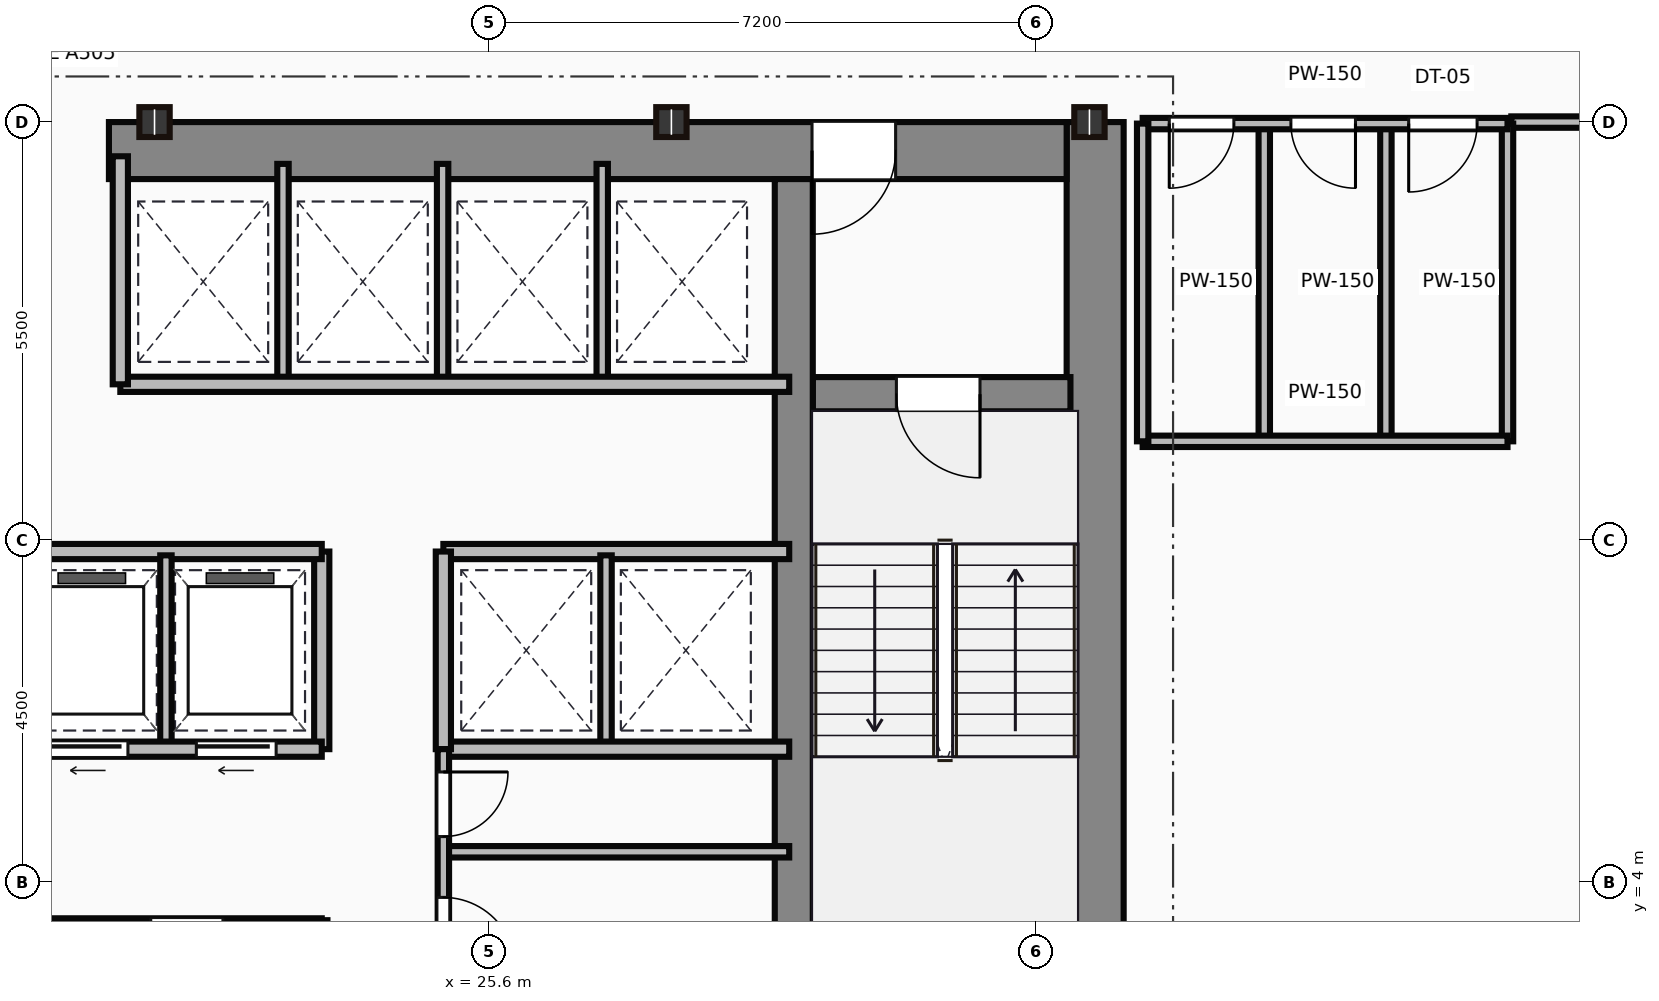
"""IFC4 building model, lengths in metres.
Left out: names, types, materials, properties, quantities, classifications, styles, units other than length and angle.
Written with IfcOpenShell. Run it as: python <this file> out.ifc"""

import sys

from ifc_helpers import new_model, si_unit, direction, frame, frame_2d, origin, origin_2d, place, context, subcontext, project, spatial, rectangle, i_section, extrude, source, transform, mapped, element, fill, save


model = new_model("IFC4")
c1 = context("Model", 3, precision=1e-05, world=origin(), true_north=direction((0.0, 1.0)))
c2 = subcontext(c1, "Body", "Model", "MODEL_VIEW")
j1 = project(units=[si_unit("LENGTHUNIT", "METRE"), si_unit("PLANEANGLEUNIT", "RADIAN")], contexts=[c1])
p1 = place(None, origin())
s1 = spatial("IfcSite", under=j1, at=p1, CompositionType="ELEMENT")
p2 = place(p1, origin())
s2 = spatial("IfcBuilding", under=s1, at=p2, CompositionType="ELEMENT")
p3 = place(p2, frame((0.0, 0.0, 106.9)))
s3 = spatial("IfcBuildingStorey", under=s2, at=p3, CompositionType="ELEMENT", Elevation=106.9)
m1 = source(origin(), c2, "Body", "SweptSolid", [
    extrude(rectangle(XDim=13.1, YDim=0.75, at=frame_2d((6.55, 0.0))), origin(), (0.0, 0.0, 1.0), 3.65),
])
p4 = place(p3, frame((33.575, 0.9, 0.0), z_axis=(0.0, 0.0, 1.0), x_axis=(0.0, 1.0, 0.0)))
e1 = element("IfcWall", 1, at=p4, inside=s3, PredefinedType="SHEAR", context=c2, shape_type="MappedRepresentation", body=[
    mapped(m1, transform((0.0, 0.0, 0.0))),
])
m2 = source(origin(), c2, "Body", "SweptSolid", [
    extrude(rectangle(XDim=12.6, YDim=0.75, at=frame_2d((6.3, 0.0))), origin(), (0.0, 0.0, 1.0), 3.65),
])
p5 = place(p3, frame((20.6, 13.625, 0.0), z_axis=(0.0, 0.0, 1.0), x_axis=(1.0, 0.0, 0.0)))
e2 = element("IfcWall", 2, at=p5, inside=s3, PredefinedType="SHEAR", context=c2, shape_type="MappedRepresentation", body=[
    mapped(m2, transform((0.0, 0.0, 0.0))),
])
p6 = place(p5, frame((9.25, 0.0, 0.0)))
e3 = element("IfcOpeningElement", 3, at=p6, cuts=e2, PredefinedType="OPENING", context=c2, shape_type="SweptSolid", body=[
    extrude(rectangle(XDim=1.1, YDim=2.15, at=frame_2d((0.55, 1.075))), frame((0.0, 0.385, 0.0), z_axis=(0.0, -1.0, 0.0), x_axis=(1.0, 0.0, 0.0)), (0.0, 0.0, 1.0), 0.77),
])
m3 = source(origin(), c2, "Body", "SweptSolid", [
    extrude(rectangle(XDim=12.35, YDim=0.5, at=frame_2d((6.175, 0.0))), origin(), (0.0, 0.0, 1.0), 3.65),
])
p7 = place(p3, frame((29.61, 0.9, 0.0), z_axis=(0.0, 0.0, 1.0), x_axis=(0.0, 1.0, 0.0)))
e4 = element("IfcWall", 4, at=p7, inside=s3, PredefinedType="SHEAR", context=c2, shape_type="MappedRepresentation", body=[
    mapped(m3, transform((0.0, 0.0, 0.0))),
])
m4 = source(origin(), c2, "Body", "SweptSolid", [
    extrude(rectangle(XDim=3.39, YDim=0.45, at=frame_2d((1.695, 0.0))), origin(), (0.0, 0.0, 1.0), 3.65),
])
p8 = place(p3, frame((29.86, 10.42, 0.0), z_axis=(0.0, 0.0, 1.0), x_axis=(1.0, 0.0, 0.0)))
e5 = element("IfcWall", 5, at=p8, inside=s3, PredefinedType="SHEAR", context=c2, shape_type="MappedRepresentation", body=[
    mapped(m4, transform((0.0, 0.0, 0.0))),
])
p9 = place(p8, frame((1.1, 0.0, 0.0)))
e6 = element("IfcOpeningElement", 6, at=p9, cuts=e5, PredefinedType="OPENING", context=c2, shape_type="SweptSolid", body=[
    extrude(rectangle(XDim=1.1, YDim=2.15, at=frame_2d((0.55, 1.075))), frame((0.0, 0.235, 0.0), z_axis=(0.0, -1.0, 0.0), x_axis=(1.0, 0.0, 0.0)), (0.0, 0.0, 1.0), 0.47),
])
m5 = source(origin(), c2, "Body", "SweptSolid", [
    extrude(i_section(OverallWidth=0.399, OverallDepth=0.393, WebThickness=0.023, FlangeThickness=0.037, at=origin_2d()), origin(), (0.0, 0.0, 1.0), 3.65),
])
for number, where, z_axis, x_axis in (
    (7, (21.2, 14.0, 0.0), (0.0, 0.0, 1.0), (1.0, 0.0, 0.0)),
    (8, (28.0, 14.0, 0.0), (0.0, 0.0, 1.0), (1.0, 0.0, 0.0)),
    (9, (33.5, 14.0, 0.0), (0.0, 0.0, 1.0), (1.0, 0.0, 0.0)),
):
    element("IfcColumn", number, at=place(p3, frame(where, z_axis=z_axis, x_axis=x_axis)), inside=s3, PredefinedType="COLUMN", context=c2, shape_type="MappedRepresentation", body=[
        mapped(m5, transform((0.0, 0.0, 0.0))),
    ])
m6 = source(origin(), c2, "Body", "SweptSolid", [
    extrude(rectangle(XDim=10.35, YDim=0.15, at=frame_2d((5.175, 0.0))), origin(), (0.0, 0.0, 1.0), 3.4),
])
p10 = place(p3, frame((13.05, 3.45, 0.0), z_axis=(0.0, 0.0, 1.0), x_axis=(1.0, 0.0, 0.0)))
e10 = element("IfcWall", 10, at=p10, inside=s3, PredefinedType="PARTITIONING", context=c2, shape_type="MappedRepresentation", body=[
    mapped(m6, transform((0.0, 0.0, 0.0))),
])
p11 = place(p10, frame((3.8, 0.0, 0.0)))
e11 = element("IfcOpeningElement", 11, at=p11, cuts=e10, PredefinedType="OPENING", context=c2, shape_type="SweptSolid", body=[
    extrude(rectangle(XDim=0.95, YDim=2.15, at=frame_2d((0.475, 1.075))), frame((0.0, 0.085, 0.0), z_axis=(0.0, -1.0, 0.0), x_axis=(1.0, 0.0, 0.0)), (0.0, 0.0, 1.0), 0.17),
])
p12 = place(p10, frame((8.1, 0.0, 0.0)))
e12 = element("IfcOpeningElement", 12, at=p12, cuts=e10, PredefinedType="OPENING", context=c2, shape_type="SweptSolid", body=[
    extrude(rectangle(XDim=0.95, YDim=2.15, at=frame_2d((0.475, 1.075))), frame((0.0, 0.085, 0.0), z_axis=(0.0, -1.0, 0.0), x_axis=(1.0, 0.0, 0.0)), (0.0, 0.0, 1.0), 0.17),
])
m7 = source(origin(), c2, "Body", "SweptSolid", [
    extrude(rectangle(XDim=2.65, YDim=0.15, at=frame_2d((1.325, 0.0))), origin(), (0.0, 0.0, 1.0), 3.4),
])
p13 = place(p3, frame((23.4, 0.85, 0.0), z_axis=(0.0, 0.0, 1.0), x_axis=(0.0, 1.0, 0.0)))
e13 = element("IfcWall", 13, at=p13, inside=s3, PredefinedType="PARTITIONING", context=c2, shape_type="MappedRepresentation", body=[
    mapped(m7, transform((0.0, 0.0, 0.0))),
])
m8 = source(origin(), c2, "Body", "SweptSolid", [
    extrude(rectangle(XDim=11.85, YDim=0.2, at=frame_2d((5.925, 0.0))), origin(), (0.0, 0.0, 1.0), 3.4),
])
p14 = place(p3, frame((11.55, 5.75, 0.0), z_axis=(0.0, 0.0, 1.0), x_axis=(1.0, 0.0, 0.0)))
e14 = element("IfcWall", 14, at=p14, inside=s3, PredefinedType="PARTITIONING", context=c2, shape_type="MappedRepresentation", body=[
    mapped(m8, transform((0.0, 0.0, 0.0))),
])
p15 = place(p14, frame((0.45, 0.0, 0.0)))
e15 = element("IfcOpeningElement", 15, at=p15, cuts=e14, PredefinedType="OPENING", context=c2, shape_type="SweptSolid", body=[
    extrude(rectangle(XDim=1.05, YDim=2.15, at=frame_2d((0.525, 1.075))), frame((0.0, 0.11, 0.0), z_axis=(0.0, -1.0, 0.0), x_axis=(1.0, 0.0, 0.0)), (0.0, 0.0, 1.0), 0.22),
])
p16 = place(p14, frame((2.4, 0.0, 0.0)))
e16 = element("IfcOpeningElement", 16, at=p16, cuts=e14, PredefinedType="OPENING", context=c2, shape_type="SweptSolid", body=[
    extrude(rectangle(XDim=1.05, YDim=2.15, at=frame_2d((0.525, 1.075))), frame((0.0, 0.11, 0.0), z_axis=(0.0, -1.0, 0.0), x_axis=(1.0, 0.0, 0.0)), (0.0, 0.0, 1.0), 0.22),
])
p17 = place(p14, frame((4.35, 0.0, 0.0)))
e17 = element("IfcOpeningElement", 17, at=p17, cuts=e14, PredefinedType="OPENING", context=c2, shape_type="SweptSolid", body=[
    extrude(rectangle(XDim=1.05, YDim=2.15, at=frame_2d((0.525, 1.075))), frame((0.0, 0.11, 0.0), z_axis=(0.0, -1.0, 0.0), x_axis=(1.0, 0.0, 0.0)), (0.0, 0.0, 1.0), 0.22),
])
p18 = place(p14, frame((6.3, 0.0, 0.0)))
e18 = element("IfcOpeningElement", 18, at=p18, cuts=e14, PredefinedType="OPENING", context=c2, shape_type="SweptSolid", body=[
    extrude(rectangle(XDim=1.05, YDim=2.15, at=frame_2d((0.525, 1.075))), frame((0.0, 0.11, 0.0), z_axis=(0.0, -1.0, 0.0), x_axis=(1.0, 0.0, 0.0)), (0.0, 0.0, 1.0), 0.22),
])
p19 = place(p14, frame((8.25, 0.0, 0.0)))
e19 = element("IfcOpeningElement", 19, at=p19, cuts=e14, PredefinedType="OPENING", context=c2, shape_type="SweptSolid", body=[
    extrude(rectangle(XDim=1.05, YDim=2.15, at=frame_2d((0.525, 1.075))), frame((0.0, 0.11, 0.0), z_axis=(0.0, -1.0, 0.0), x_axis=(1.0, 0.0, 0.0)), (0.0, 0.0, 1.0), 0.22),
])
p20 = place(p14, frame((10.2, 0.0, 0.0)))
e20 = element("IfcOpeningElement", 20, at=p20, cuts=e14, PredefinedType="OPENING", context=c2, shape_type="SweptSolid", body=[
    extrude(rectangle(XDim=1.05, YDim=2.15, at=frame_2d((0.525, 1.075))), frame((0.0, 0.11, 0.0), z_axis=(0.0, -1.0, 0.0), x_axis=(1.0, 0.0, 0.0)), (0.0, 0.0, 1.0), 0.22),
])
p21 = place(p3, frame((11.55, 8.35, 0.0), z_axis=(0.0, 0.0, 1.0), x_axis=(1.0, 0.0, 0.0)))
e21 = element("IfcWall", 21, at=p21, inside=s3, PredefinedType="PARTITIONING", context=c2, shape_type="MappedRepresentation", body=[
    mapped(m8, transform((0.0, 0.0, 0.0))),
])
m9 = source(origin(), c2, "Body", "SweptSolid", [
    extrude(rectangle(XDim=2.6, YDim=0.2, at=frame_2d((1.3, 0.0))), origin(), (0.0, 0.0, 1.0), 3.4),
])
p22 = place(p3, frame((23.4, 5.75, 0.0), z_axis=(0.0, 0.0, 1.0), x_axis=(0.0, 1.0, 0.0)))
e22 = element("IfcWall", 22, at=p22, inside=s3, PredefinedType="PARTITIONING", context=c2, shape_type="MappedRepresentation", body=[
    mapped(m9, transform((0.0, 0.0, 0.0))),
])
m10 = source(origin(), c2, "Body", "SweptSolid", [
    extrude(rectangle(XDim=2.5, YDim=0.15, at=frame_2d((1.25, 0.0))), origin(), (0.0, 0.0, 1.0), 3.4),
])
p23 = place(p3, frame((21.35, 5.8, 0.0), z_axis=(0.0, 0.0, 1.0), x_axis=(0.0, 1.0, 0.0)))
e23 = element("IfcWall", 23, at=p23, inside=s3, PredefinedType="PARTITIONING", context=c2, shape_type="MappedRepresentation", body=[
    mapped(m10, transform((0.0, 0.0, 0.0))),
])
m11 = source(origin(), c2, "Body", "SweptSolid", [
    extrude(rectangle(XDim=8.8, YDim=0.2, at=frame_2d((4.4, 0.0))), origin(), (0.0, 0.0, 1.0), 3.4),
])
p24 = place(p3, frame((20.75, 10.55, 0.0), z_axis=(0.0, 0.0, 1.0), x_axis=(1.0, 0.0, 0.0)))
e24 = element("IfcWall", 24, at=p24, inside=s3, PredefinedType="PARTITIONING", context=c2, shape_type="MappedRepresentation", body=[
    mapped(m11, transform((0.0, 0.0, 0.0))),
])
m12 = source(origin(), c2, "Body", "SweptSolid", [
    extrude(rectangle(XDim=3.0, YDim=0.2, at=frame_2d((1.5, 0.0))), origin(), (0.0, 0.0, 1.0), 3.4),
])
p25 = place(p3, frame((20.75, 10.55, 0.0), z_axis=(0.0, 0.0, 1.0), x_axis=(0.0, 1.0, 0.0)))
e25 = element("IfcWall", 25, at=p25, inside=s3, PredefinedType="PARTITIONING", context=c2, shape_type="MappedRepresentation", body=[
    mapped(m12, transform((0.0, 0.0, 0.0))),
])
m13 = source(origin(), c2, "Body", "SweptSolid", [
    extrude(rectangle(XDim=2.85, YDim=0.15, at=frame_2d((1.425, 0.0))), origin(), (0.0, 0.0, 1.0), 3.4),
])
for number, where, z_axis, x_axis in (
    (26, (22.89, 10.6, 0.0), (0.0, 0.0, 1.0), (0.0, 1.0, 0.0)),
    (27, (24.99, 10.6, 0.0), (0.0, 0.0, 1.0), (0.0, 1.0, 0.0)),
    (28, (27.09, 10.6, 0.0), (0.0, 0.0, 1.0), (0.0, 1.0, 0.0)),
):
    element("IfcWall", number, at=place(p3, frame(where, z_axis=z_axis, x_axis=x_axis)), inside=s3, PredefinedType="PARTITIONING", context=c2, shape_type="MappedRepresentation", body=[
        mapped(m13, transform((0.0, 0.0, 0.0))),
    ])
m14 = source(origin(), c2, "Body", "SweptSolid", [
    extrude(rectangle(XDim=4.55, YDim=0.2, at=frame_2d((2.275, 0.0))), origin(), (0.0, 0.0, 1.0), 3.4),
])
for number, where, z_axis, x_axis in (
    (29, (25.0, 8.35, 0.0), (0.0, 0.0, 1.0), (1.0, 0.0, 0.0)),
    (30, (25.0, 5.75, 0.0), (0.0, 0.0, 1.0), (1.0, 0.0, 0.0)),
):
    element("IfcWall", number, at=place(p3, frame(where, z_axis=z_axis, x_axis=x_axis)), inside=s3, PredefinedType="PARTITIONING", context=c2, shape_type="MappedRepresentation", body=[
        mapped(m14, transform((0.0, 0.0, 0.0))),
    ])
p26 = place(p3, frame((25.0, 5.75, 0.0), z_axis=(0.0, 0.0, 1.0), x_axis=(0.0, 1.0, 0.0)))
e31 = element("IfcWall", 31, at=p26, inside=s3, PredefinedType="PARTITIONING", context=c2, shape_type="MappedRepresentation", body=[
    mapped(m9, transform((0.0, 0.0, 0.0))),
])
p27 = place(p3, frame((27.14, 5.8, 0.0), z_axis=(0.0, 0.0, 1.0), x_axis=(0.0, 1.0, 0.0)))
e32 = element("IfcWall", 32, at=p27, inside=s3, PredefinedType="PARTITIONING", context=c2, shape_type="MappedRepresentation", body=[
    mapped(m10, transform((0.0, 0.0, 0.0))),
])
m15 = source(origin(), c2, "Body", "SweptSolid", [
    extrude(rectangle(XDim=4.9, YDim=0.15, at=frame_2d((2.45, 0.0))), origin(), (0.0, 0.0, 1.0), 3.4),
])
p28 = place(p3, frame((25.0, 0.85, 0.0), z_axis=(0.0, 0.0, 1.0), x_axis=(0.0, 1.0, 0.0)))
e33 = element("IfcWall", 33, at=p28, inside=s3, PredefinedType="PARTITIONING", context=c2, shape_type="MappedRepresentation", body=[
    mapped(m15, transform((0.0, 0.0, 0.0))),
])
p29 = place(p28, frame((2.0, 0.0, 0.0)))
e34 = element("IfcOpeningElement", 34, at=p29, cuts=e33, PredefinedType="OPENING", context=c2, shape_type="SweptSolid", body=[
    extrude(rectangle(XDim=0.95, YDim=2.15, at=frame_2d((0.475, 1.075))), frame((0.0, 0.085, 0.0), z_axis=(0.0, -1.0, 0.0), x_axis=(1.0, 0.0, 0.0)), (0.0, 0.0, 1.0), 0.17),
])
p30 = place(p28, frame((3.75, 0.0, 0.0)))
e35 = element("IfcOpeningElement", 35, at=p30, cuts=e33, PredefinedType="OPENING", context=c2, shape_type="SweptSolid", body=[
    extrude(rectangle(XDim=0.85, YDim=2.15, at=frame_2d((0.425, 1.075))), frame((0.0, 0.085, 0.0), z_axis=(0.0, -1.0, 0.0), x_axis=(1.0, 0.0, 0.0)), (0.0, 0.0, 1.0), 0.17),
])
m16 = source(origin(), c2, "Body", "SweptSolid", [
    extrude(rectangle(XDim=4.55, YDim=0.15, at=frame_2d((2.275, 0.0))), origin(), (0.0, 0.0, 1.0), 3.4),
])
p31 = place(p3, frame((25.0, 4.4, 0.0), z_axis=(0.0, 0.0, 1.0), x_axis=(1.0, 0.0, 0.0)))
e36 = element("IfcWall", 36, at=p31, inside=s3, PredefinedType="PARTITIONING", context=c2, shape_type="MappedRepresentation", body=[
    mapped(m16, transform((0.0, 0.0, 0.0))),
])
m17 = source(origin(), c2, "Body", "SweptSolid", [
    extrude(rectangle(XDim=4.8, YDim=0.15, at=frame_2d((2.4, 0.0))), origin(), (0.0, 0.0, 1.0), 2.702),
])
p32 = place(p3, frame((34.2, 13.98, 0.0), z_axis=(0.0, 0.0, 1.0), x_axis=(1.0, 0.0, 0.0)))
e37 = element("IfcWall", 37, at=p32, inside=s3, PredefinedType="PARTITIONING", context=c2, shape_type="MappedRepresentation", body=[
    mapped(m17, transform((0.0, 0.0, 0.0))),
])
p33 = place(p32, frame((0.35, 0.0, 0.0)))
e38 = element("IfcOpeningElement", 38, at=p33, cuts=e37, PredefinedType="OPENING", context=c2, shape_type="SweptSolid", body=[
    extrude(rectangle(XDim=0.85, YDim=2.1, at=frame_2d((0.425, 1.05))), frame((0.0, 0.085, 0.0), z_axis=(0.0, -1.0, 0.0), x_axis=(1.0, 0.0, 0.0)), (0.0, 0.0, 1.0), 0.17),
])
p34 = place(p32, frame((1.95, 0.0, 0.0)))
e39 = element("IfcOpeningElement", 39, at=p34, cuts=e37, PredefinedType="OPENING", context=c2, shape_type="SweptSolid", body=[
    extrude(rectangle(XDim=0.85, YDim=2.1, at=frame_2d((0.425, 1.05))), frame((0.0, 0.085, 0.0), z_axis=(0.0, -1.0, 0.0), x_axis=(1.0, 0.0, 0.0)), (0.0, 0.0, 1.0), 0.17),
])
p35 = place(p32, frame((3.5, 0.0, 0.0)))
e40 = element("IfcOpeningElement", 40, at=p35, cuts=e37, PredefinedType="OPENING", context=c2, shape_type="SweptSolid", body=[
    extrude(rectangle(XDim=0.9, YDim=2.1, at=frame_2d((0.45, 1.05))), frame((0.0, 0.085, 0.0), z_axis=(0.0, -1.0, 0.0), x_axis=(1.0, 0.0, 0.0)), (0.0, 0.0, 1.0), 0.17),
])
m18 = source(origin(), c2, "Body", "SweptSolid", [
    extrude(rectangle(XDim=4.8, YDim=0.15, at=frame_2d((2.4, 0.0))), origin(), (0.0, 0.0, 1.0), 3.4),
])
p36 = place(p3, frame((34.2, 9.8, 0.0), z_axis=(0.0, 0.0, 1.0), x_axis=(1.0, 0.0, 0.0)))
e41 = element("IfcWall", 41, at=p36, inside=s3, PredefinedType="PARTITIONING", context=c2, shape_type="MappedRepresentation", body=[
    mapped(m18, transform((0.0, 0.0, 0.0))),
])
m19 = source(origin(), c2, "Body", "SweptSolid", [
    extrude(rectangle(XDim=4.18, YDim=0.15, at=frame_2d((2.09, 0.0))), origin(), (0.0, 0.0, 1.0), 3.4),
])
for number, where, z_axis, x_axis in (
    (42, (39.0, 9.8, 0.0), (0.0, 0.0, 1.0), (0.0, 1.0, 0.0)),
    (43, (34.2, 9.8, 0.0), (0.0, 0.0, 1.0), (0.0, 1.0, 0.0)),
    (44, (35.8, 9.8, 0.0), (0.0, 0.0, 1.0), (0.0, 1.0, 0.0)),
    (45, (37.4, 9.8, 0.0), (0.0, 0.0, 1.0), (0.0, 1.0, 0.0)),
):
    element("IfcWall", number, at=place(p3, frame(where, z_axis=z_axis, x_axis=x_axis)), inside=s3, PredefinedType="PARTITIONING", context=c2, shape_type="MappedRepresentation", body=[
        mapped(m19, transform((0.0, 0.0, 0.0))),
    ])
m20 = source(origin(), c2, "Body", "SweptSolid", [
    extrude(rectangle(XDim=1.75, YDim=0.15, at=frame_2d((0.875, 0.0))), origin(), (0.0, 0.0, 1.0), 2.702),
])
p37 = place(p3, frame((40.8, 14.0, 0.0), z_axis=(0.0, 0.0, 1.0), x_axis=(-1.0, 0.0, 0.0)))
e46 = element("IfcWall", 46, at=p37, inside=s3, PredefinedType="PARTITIONING", context=c2, shape_type="MappedRepresentation", body=[
    mapped(m20, transform((0.0, 0.0, 0.0))),
])
m21 = source(origin(), c2, "Body", "SweptSolid", [
    extrude(rectangle(XDim=1.1, YDim=2.15, at=frame_2d((0.55, 1.075))), frame((0.0, 0.025, 0.0), z_axis=(0.0, -1.0, 0.0), x_axis=(1.0, 0.0, 0.0)), (0.0, 0.0, 1.0), 0.05),
])
p38 = place(p9, frame((1.1, 0.0, 0.0), z_axis=(0.0, 0.0, 1.0), x_axis=(-1.0, 0.0, 0.0)))
e47 = element("IfcDoor", 47, at=p38, inside=s3, OperationType="SINGLE_SWING_RIGHT", PredefinedType="DOOR", context=c2, shape_type="MappedRepresentation", body=[
    mapped(m21, transform((0.0, 0.0, 0.0))),
])
fill(e6, e47)
p39 = place(p6, origin())
e48 = element("IfcDoor", 48, at=p39, inside=s3, OperationType="SINGLE_SWING_LEFT", PredefinedType="DOOR", context=c2, shape_type="MappedRepresentation", body=[
    mapped(m21, transform((0.0, 0.0, 0.0))),
])
fill(e3, e48)
m22 = source(origin(), c2, "Body", "SweptSolid", [
    extrude(rectangle(XDim=1.05, YDim=2.15, at=frame_2d((0.525, 1.075))), frame((0.0, 0.025, 0.0), z_axis=(0.0, -1.0, 0.0), x_axis=(1.0, 0.0, 0.0)), (0.0, 0.0, 1.0), 0.05),
])
p40 = place(p19, frame((1.05, 0.0, 0.0), z_axis=(0.0, 0.0, 1.0), x_axis=(-1.0, 0.0, 0.0)))
e49 = element("IfcDoor", 49, at=p40, inside=s3, OperationType="SLIDING_TO_LEFT", PredefinedType="DOOR", context=c2, shape_type="MappedRepresentation", body=[
    mapped(m22, transform((0.0, 0.0, 0.0))),
])
fill(e19, e49)
p41 = place(p20, frame((1.05, 0.0, 0.0), z_axis=(0.0, 0.0, 1.0), x_axis=(-1.0, 0.0, 0.0)))
e50 = element("IfcDoor", 50, at=p41, inside=s3, OperationType="SLIDING_TO_LEFT", PredefinedType="DOOR", context=c2, shape_type="MappedRepresentation", body=[
    mapped(m22, transform((0.0, 0.0, 0.0))),
])
fill(e20, e50)
m23 = source(origin(), c2, "Body", "SweptSolid", [
    extrude(rectangle(XDim=0.95, YDim=2.15, at=frame_2d((0.475, 1.075))), frame((0.0, 0.025, 0.0), z_axis=(0.0, -1.0, 0.0), x_axis=(1.0, 0.0, 0.0)), (0.0, 0.0, 1.0), 0.05),
])
p42 = place(p29, origin())
e51 = element("IfcDoor", 51, at=p42, inside=s3, OperationType="SINGLE_SWING_LEFT", PredefinedType="DOOR", context=c2, shape_type="MappedRepresentation", body=[
    mapped(m23, transform((0.0, 0.0, 0.0))),
])
fill(e34, e51)
m24 = source(origin(), c2, "Body", "SweptSolid", [
    extrude(rectangle(XDim=0.85, YDim=2.15, at=frame_2d((0.425, 1.075))), frame((0.0, 0.025, 0.0), z_axis=(0.0, -1.0, 0.0), x_axis=(1.0, 0.0, 0.0)), (0.0, 0.0, 1.0), 0.05),
])
p43 = place(p30, origin())
e52 = element("IfcDoor", 52, at=p43, inside=s3, OperationType="SINGLE_SWING_RIGHT", PredefinedType="DOOR", context=c2, shape_type="MappedRepresentation", body=[
    mapped(m24, transform((0.0, 0.0, 0.0))),
])
fill(e35, e52)
m25 = source(origin(), c2, "Body", "SweptSolid", [
    extrude(rectangle(XDim=0.85, YDim=2.1, at=frame_2d((0.425, 1.05))), frame((0.0, 0.025, 0.0), z_axis=(0.0, -1.0, 0.0), x_axis=(1.0, 0.0, 0.0)), (0.0, 0.0, 1.0), 0.05),
])
p44 = place(p33, frame((0.85, 0.0, 0.0), z_axis=(0.0, 0.0, 1.0), x_axis=(-1.0, 0.0, 0.0)))
e53 = element("IfcDoor", 53, at=p44, inside=s3, OperationType="SINGLE_SWING_LEFT", PredefinedType="DOOR", context=c2, shape_type="MappedRepresentation", body=[
    mapped(m25, transform((0.0, 0.0, 0.0))),
])
fill(e38, e53)
p45 = place(p34, frame((0.85, 0.0, 0.0), z_axis=(0.0, 0.0, 1.0), x_axis=(-1.0, 0.0, 0.0)))
e54 = element("IfcDoor", 54, at=p45, inside=s3, OperationType="SINGLE_SWING_RIGHT", PredefinedType="DOOR", context=c2, shape_type="MappedRepresentation", body=[
    mapped(m25, transform((0.0, 0.0, 0.0))),
])
fill(e39, e54)
m26 = source(origin(), c2, "Body", "SweptSolid", [
    extrude(rectangle(XDim=0.9, YDim=2.1, at=frame_2d((0.45, 1.05))), frame((0.0, 0.025, 0.0), z_axis=(0.0, -1.0, 0.0), x_axis=(1.0, 0.0, 0.0)), (0.0, 0.0, 1.0), 0.05),
])
p46 = place(p35, frame((0.9, 0.0, 0.0), z_axis=(0.0, 0.0, 1.0), x_axis=(-1.0, 0.0, 0.0)))
e55 = element("IfcDoor", 55, at=p46, inside=s3, OperationType="SINGLE_SWING_LEFT", PredefinedType="DOOR", context=c2, shape_type="MappedRepresentation", body=[
    mapped(m26, transform((0.0, 0.0, 0.0))),
])
fill(e40, e55)
save(model, sys.argv[1])
